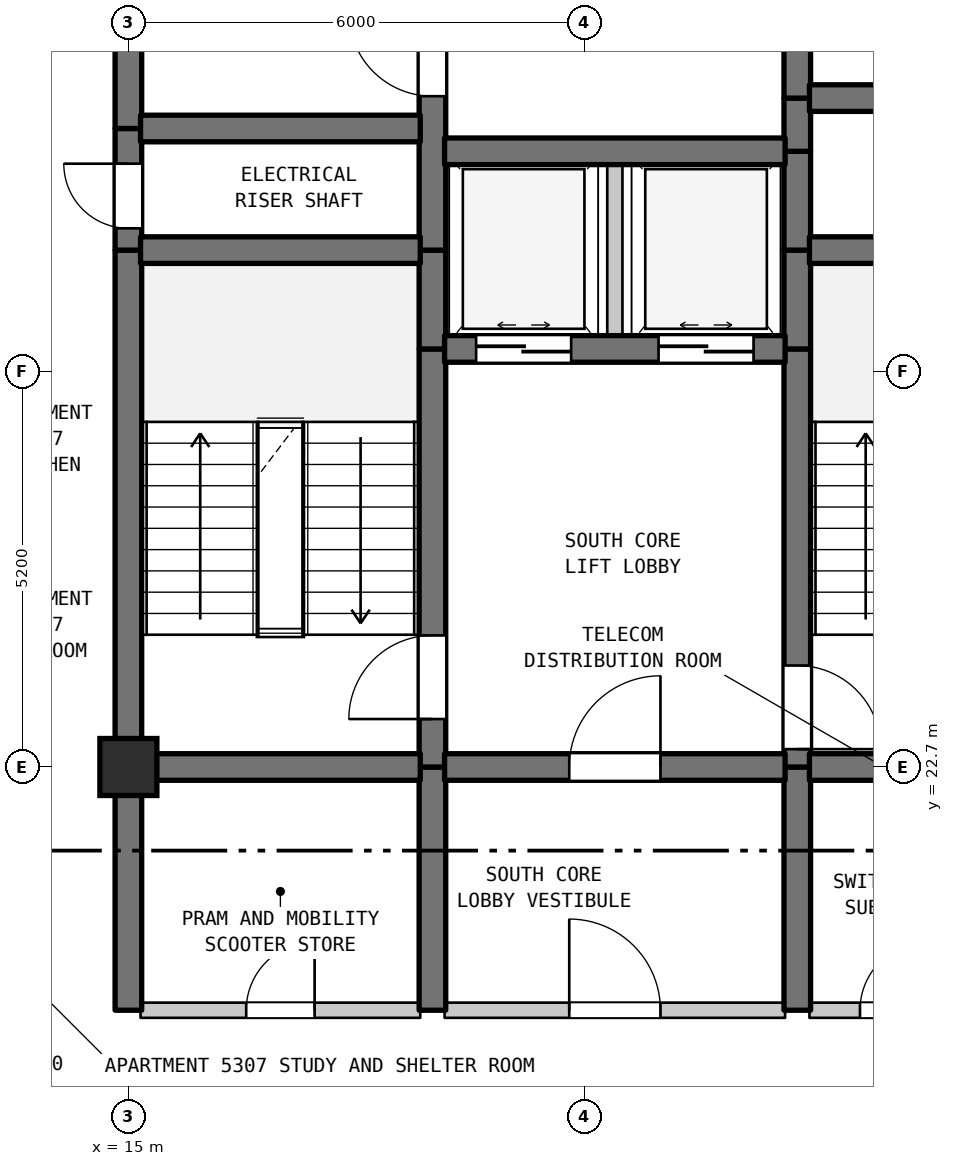
"""IFC4 building model, lengths in metres.
Left out: names, types, materials, properties, quantities, classifications, styles, units other than length and angle.
Written with IfcOpenShell. Run it as: python <this file> out.ifc"""

import sys

from ifc_helpers import new_model, si_unit, direction, frame, frame_2d, origin, origin_2d, place, context, subcontext, project, spatial, rectangle, extrude, element, fill, save


model = new_model("IFC4")
c1 = context("Model", 3, precision=1e-05, world=origin(), true_north=direction((0.0, 1.0)))
c2 = subcontext(c1, "Body", "Model", "MODEL_VIEW")
j1 = project(units=[si_unit("LENGTHUNIT", "METRE"), si_unit("PLANEANGLEUNIT", "RADIAN")], contexts=[c1])
p1 = place(None, origin())
s1 = spatial("IfcSite", under=j1, at=p1, CompositionType="ELEMENT")
p2 = place(p1, origin())
s2 = spatial("IfcBuilding", under=s1, at=p2, CompositionType="ELEMENT")
p3 = place(p2, frame((0.0, 0.0, 214.3)))
s3 = spatial("IfcBuildingStorey", under=s2, at=p3, CompositionType="ELEMENT", Elevation=214.3)
p4 = place(p3, frame((15.0, 22.7, 0.0), z_axis=(0.0, 0.0, 1.0), x_axis=(1.0, 0.0, 0.0)))
e1 = element("IfcColumn", 1, at=p4, inside=s3, PredefinedType="COLUMN", context=c2, shape_type="SweptSolid", body=[
    extrude(rectangle(XDim=0.75, YDim=0.75, at=origin_2d()), origin(), (0.0, 0.0, 1.0), 3.7),
])
p5 = place(p3, frame((15.0, 19.5, 0.0), z_axis=(0.0, 0.0, 1.0), x_axis=(0.0, 1.0, 0.0)))
e2 = element("IfcWall", 2, at=p5, inside=s3, PredefinedType="SHEAR", context=c2, shape_type="SweptSolid", body=[
    extrude(rectangle(XDim=3.2, YDim=0.35, at=frame_2d((1.6, 0.0))), origin(), (0.0, 0.0, 1.0), 3.38),
])
p6 = place(p3, frame((15.0, 22.7, 0.0), z_axis=(0.0, 0.0, 1.0), x_axis=(0.0, 1.0, 0.0)))
e3 = element("IfcWall", 3, at=p6, inside=s3, PredefinedType="SHEAR", context=c2, shape_type="SweptSolid", body=[
    extrude(rectangle(XDim=6.8, YDim=0.35, at=frame_2d((3.4, 0.0))), origin(), (0.0, 0.0, 1.0), 3.38),
])
p7 = place(p3, frame((15.0, 29.5, 0.0), z_axis=(0.0, 0.0, 1.0), x_axis=(0.0, 1.0, 0.0)))
e4 = element("IfcWall", 4, at=p7, inside=s3, PredefinedType="SHEAR", context=c2, shape_type="SweptSolid", body=[
    extrude(rectangle(XDim=1.6, YDim=0.35, at=frame_2d((0.8, 0.0))), origin(), (0.0, 0.0, 1.0), 3.38),
])
p8 = place(p7, frame((0.287, 0.0, 0.0)))
e5 = element("IfcOpeningElement", 5, at=p8, cuts=e4, PredefinedType="OPENING", context=c2, shape_type="SweptSolid", body=[
    extrude(rectangle(XDim=0.85, YDim=2.1, at=frame_2d((0.425, 1.05))), frame((0.0, 0.185, 0.0), z_axis=(0.0, -1.0, 0.0), x_axis=(1.0, 0.0, 0.0)), (0.0, 0.0, 1.0), 0.37),
])
p9 = place(p3, frame((15.0, 31.1, 0.0), z_axis=(0.0, 0.0, 1.0), x_axis=(0.0, 1.0, 0.0)))
e6 = element("IfcWall", 6, at=p9, inside=s3, PredefinedType="SHEAR", context=c2, shape_type="SweptSolid", body=[
    extrude(rectangle(XDim=6.8, YDim=0.35, at=frame_2d((3.4, 0.0))), origin(), (0.0, 0.0, 1.0), 3.38),
])
p10 = place(p3, frame((19.0, 19.5, 0.0), z_axis=(0.0, 0.0, 1.0), x_axis=(0.0, 1.0, 0.0)))
e7 = element("IfcWall", 7, at=p10, inside=s3, PredefinedType="SHEAR", context=c2, shape_type="SweptSolid", body=[
    extrude(rectangle(XDim=3.2, YDim=0.35, at=frame_2d((1.6, 0.0))), origin(), (0.0, 0.0, 1.0), 3.38),
])
p11 = place(p3, frame((19.0, 22.7, 0.0), z_axis=(0.0, 0.0, 1.0), x_axis=(0.0, 1.0, 0.0)))
e8 = element("IfcWall", 8, at=p11, inside=s3, PredefinedType="SHEAR", context=c2, shape_type="SweptSolid", body=[
    extrude(rectangle(XDim=5.5, YDim=0.35, at=frame_2d((2.75, 0.0))), origin(), (0.0, 0.0, 1.0), 3.38),
])
p12 = place(p11, frame((0.631, 0.0, 0.0)))
e9 = element("IfcOpeningElement", 9, at=p12, cuts=e8, PredefinedType="OPENING", context=c2, shape_type="SweptSolid", body=[
    extrude(rectangle(XDim=1.1, YDim=2.15, at=frame_2d((0.55, 1.075))), frame((0.0, 0.185, 0.0), z_axis=(0.0, -1.0, 0.0), x_axis=(1.0, 0.0, 0.0)), (0.0, 0.0, 1.0), 0.37),
])
p13 = place(p3, frame((19.0, 28.2, 0.0), z_axis=(0.0, 0.0, 1.0), x_axis=(0.0, 1.0, 0.0)))
e10 = element("IfcWall", 10, at=p13, inside=s3, PredefinedType="SHEAR", context=c2, shape_type="SweptSolid", body=[
    extrude(rectangle(XDim=1.3, YDim=0.35, at=frame_2d((0.65, 0.0))), origin(), (0.0, 0.0, 1.0), 3.38),
])
p14 = place(p3, frame((19.0, 29.5, 0.0), z_axis=(0.0, 0.0, 1.0), x_axis=(0.0, 1.0, 0.0)))
e11 = element("IfcWall", 11, at=p14, inside=s3, PredefinedType="SHEAR", context=c2, shape_type="SweptSolid", body=[
    extrude(rectangle(XDim=5.5, YDim=0.35, at=frame_2d((2.75, 0.0))), origin(), (0.0, 0.0, 1.0), 3.38),
])
p15 = place(p14, frame((2.025, 0.0, 0.0)))
e12 = element("IfcOpeningElement", 12, at=p15, cuts=e11, PredefinedType="OPENING", context=c2, shape_type="SweptSolid", body=[
    extrude(rectangle(XDim=1.1, YDim=2.15, at=frame_2d((0.55, 1.075))), frame((0.0, 0.185, 0.0), z_axis=(0.0, -1.0, 0.0), x_axis=(1.0, 0.0, 0.0)), (0.0, 0.0, 1.0), 0.37),
])
p16 = place(p3, frame((21.4, 28.2, 0.0), z_axis=(0.0, 0.0, 1.0), x_axis=(0.0, 1.0, 0.0)))
e13 = element("IfcWall", 13, at=p16, inside=s3, PredefinedType="STANDARD", context=c2, shape_type="SweptSolid", body=[
    extrude(rectangle(XDim=2.6, YDim=0.2, at=frame_2d((1.3, 0.0))), origin(), (0.0, 0.0, 1.0), 3.38),
])
p17 = place(p3, frame((23.8, 19.5, 0.0), z_axis=(0.0, 0.0, 1.0), x_axis=(0.0, 1.0, 0.0)))
e14 = element("IfcWall", 14, at=p17, inside=s3, PredefinedType="SHEAR", context=c2, shape_type="SweptSolid", body=[
    extrude(rectangle(XDim=3.2, YDim=0.35, at=frame_2d((1.6, 0.0))), origin(), (0.0, 0.0, 1.0), 3.38),
])
p18 = place(p3, frame((23.8, 22.7, 0.0), z_axis=(0.0, 0.0, 1.0), x_axis=(0.0, 1.0, 0.0)))
e15 = element("IfcWall", 15, at=p18, inside=s3, PredefinedType="SHEAR", context=c2, shape_type="SweptSolid", body=[
    extrude(rectangle(XDim=5.5, YDim=0.35, at=frame_2d((2.75, 0.0))), origin(), (0.0, 0.0, 1.0), 3.38),
])
p19 = place(p18, frame((0.235, 0.0, 0.0)))
e16 = element("IfcOpeningElement", 16, at=p19, cuts=e15, PredefinedType="OPENING", context=c2, shape_type="SweptSolid", body=[
    extrude(rectangle(XDim=1.1, YDim=2.15, at=frame_2d((0.55, 1.075))), frame((0.0, 0.185, 0.0), z_axis=(0.0, -1.0, 0.0), x_axis=(1.0, 0.0, 0.0)), (0.0, 0.0, 1.0), 0.37),
])
for number, where, z_axis, x_axis in (
    (17, (23.8, 28.2, 0.0), (0.0, 0.0, 1.0), (0.0, 1.0, 0.0)),
    (18, (23.8, 29.5, 0.0), (0.0, 0.0, 1.0), (0.0, 1.0, 0.0)),
):
    element("IfcWall", number, at=place(p3, frame(where, z_axis=z_axis, x_axis=x_axis)), inside=s3, PredefinedType="SHEAR", context=c2, shape_type="SweptSolid", body=[
        extrude(rectangle(XDim=1.3, YDim=0.35, at=frame_2d((0.65, 0.0))), origin(), (0.0, 0.0, 1.0), 3.38),
    ])
p20 = place(p3, frame((23.8, 30.8, 0.0), z_axis=(0.0, 0.0, 1.0), x_axis=(0.0, 1.0, 0.0)))
e19 = element("IfcWall", 19, at=p20, inside=s3, PredefinedType="SHEAR", context=c2, shape_type="SweptSolid", body=[
    extrude(rectangle(XDim=0.7, YDim=0.35, at=frame_2d((0.35, 0.0))), origin(), (0.0, 0.0, 1.0), 3.38),
])
p21 = place(p3, frame((23.8, 31.5, 0.0), z_axis=(0.0, 0.0, 1.0), x_axis=(0.0, 1.0, 0.0)))
e20 = element("IfcWall", 20, at=p21, inside=s3, PredefinedType="SHEAR", context=c2, shape_type="SweptSolid", body=[
    extrude(rectangle(XDim=3.5, YDim=0.35, at=frame_2d((1.75, 0.0))), origin(), (0.0, 0.0, 1.0), 3.38),
])
p22 = place(p21, frame((1.127, 0.0, 0.0)))
e21 = element("IfcOpeningElement", 21, at=p22, cuts=e20, PredefinedType="OPENING", context=c2, shape_type="SweptSolid", body=[
    extrude(rectangle(XDim=1.1, YDim=2.15, at=frame_2d((0.55, 1.075))), frame((0.0, 0.185, 0.0), z_axis=(0.0, -1.0, 0.0), x_axis=(1.0, 0.0, 0.0)), (0.0, 0.0, 1.0), 0.37),
])
p23 = place(p3, frame((15.16, 19.5, 0.0), z_axis=(0.0, 0.0, 1.0), x_axis=(1.0, 0.0, 0.0)))
e22 = element("IfcWall", 22, at=p23, inside=s3, PredefinedType="STANDARD", context=c2, shape_type="SweptSolid", body=[
    extrude(rectangle(XDim=3.68, YDim=0.2, at=frame_2d((1.84, 0.0))), origin(), (0.0, 0.0, 1.0), 3.38),
])
p24 = place(p23, frame((1.39, 0.0, 0.0)))
e23 = element("IfcOpeningElement", 23, at=p24, cuts=e22, PredefinedType="OPENING", context=c2, shape_type="SweptSolid", body=[
    extrude(rectangle(XDim=0.9, YDim=2.15, at=frame_2d((0.45, 1.075))), frame((0.0, 0.11, 0.0), z_axis=(0.0, -1.0, 0.0), x_axis=(1.0, 0.0, 0.0)), (0.0, 0.0, 1.0), 0.22),
])
p25 = place(p3, frame((19.16, 19.5, 0.0), z_axis=(0.0, 0.0, 1.0), x_axis=(1.0, 0.0, 0.0)))
e24 = element("IfcWall", 24, at=p25, inside=s3, PredefinedType="STANDARD", context=c2, shape_type="SweptSolid", body=[
    extrude(rectangle(XDim=4.48, YDim=0.2, at=frame_2d((2.24, 0.0))), origin(), (0.0, 0.0, 1.0), 3.38),
])
p26 = place(p25, frame((1.64, 0.0, 0.0)))
e25 = element("IfcOpeningElement", 25, at=p26, cuts=e24, PredefinedType="OPENING", context=c2, shape_type="SweptSolid", body=[
    extrude(rectangle(XDim=1.2, YDim=2.2, at=frame_2d((0.6, 1.1))), frame((0.0, 0.11, 0.0), z_axis=(0.0, -1.0, 0.0), x_axis=(1.0, 0.0, 0.0)), (0.0, 0.0, 1.0), 0.22),
])
p27 = place(p3, frame((23.96, 19.5, 0.0), z_axis=(0.0, 0.0, 1.0), x_axis=(1.0, 0.0, 0.0)))
e26 = element("IfcWall", 26, at=p27, inside=s3, PredefinedType="STANDARD", context=c2, shape_type="SweptSolid", body=[
    extrude(rectangle(XDim=4.455, YDim=0.2, at=frame_2d((2.228, 0.0))), origin(), (0.0, 0.0, 1.0), 3.38),
])
p28 = place(p27, frame((0.665, 0.0, 0.0)))
e27 = element("IfcOpeningElement", 27, at=p28, cuts=e26, PredefinedType="OPENING", context=c2, shape_type="SweptSolid", body=[
    extrude(rectangle(XDim=0.9, YDim=2.15, at=frame_2d((0.45, 1.075))), frame((0.0, 0.11, 0.0), z_axis=(0.0, -1.0, 0.0), x_axis=(1.0, 0.0, 0.0)), (0.0, 0.0, 1.0), 0.22),
])
p29 = place(p27, frame((2.791, 0.0, 0.0)))
e28 = element("IfcOpeningElement", 28, at=p29, cuts=e26, PredefinedType="OPENING", context=c2, shape_type="SweptSolid", body=[
    extrude(rectangle(XDim=0.9, YDim=2.15, at=frame_2d((0.45, 1.075))), frame((0.0, 0.11, 0.0), z_axis=(0.0, -1.0, 0.0), x_axis=(1.0, 0.0, 0.0)), (0.0, 0.0, 1.0), 0.22),
])
p30 = place(p3, frame((15.16, 22.7, 0.0), z_axis=(0.0, 0.0, 1.0), x_axis=(1.0, 0.0, 0.0)))
e29 = element("IfcWall", 29, at=p30, inside=s3, PredefinedType="SHEAR", context=c2, shape_type="SweptSolid", body=[
    extrude(rectangle(XDim=3.68, YDim=0.35, at=frame_2d((1.84, 0.0))), origin(), (0.0, 0.0, 1.0), 3.38),
])
p31 = place(p3, frame((19.16, 22.7, 0.0), z_axis=(0.0, 0.0, 1.0), x_axis=(1.0, 0.0, 0.0)))
e30 = element("IfcWall", 30, at=p31, inside=s3, PredefinedType="SHEAR", context=c2, shape_type="SweptSolid", body=[
    extrude(rectangle(XDim=4.48, YDim=0.35, at=frame_2d((2.24, 0.0))), origin(), (0.0, 0.0, 1.0), 3.38),
])
p32 = place(p31, frame((1.64, 0.0, 0.0)))
e31 = element("IfcOpeningElement", 31, at=p32, cuts=e30, PredefinedType="OPENING", context=c2, shape_type="SweptSolid", body=[
    extrude(rectangle(XDim=1.2, YDim=2.2, at=frame_2d((0.6, 1.1))), frame((0.0, 0.185, 0.0), z_axis=(0.0, -1.0, 0.0), x_axis=(1.0, 0.0, 0.0)), (0.0, 0.0, 1.0), 0.37),
])
p33 = place(p3, frame((23.96, 22.7, 0.0), z_axis=(0.0, 0.0, 1.0), x_axis=(1.0, 0.0, 0.0)))
e32 = element("IfcWall", 32, at=p33, inside=s3, PredefinedType="SHEAR", context=c2, shape_type="SweptSolid", body=[
    extrude(rectangle(XDim=3.18, YDim=0.35, at=frame_2d((1.59, 0.0))), origin(), (0.0, 0.0, 1.0), 3.38),
])
p34 = place(p3, frame((19.16, 28.2, 0.0), z_axis=(0.0, 0.0, 1.0), x_axis=(1.0, 0.0, 0.0)))
e33 = element("IfcWall", 33, at=p34, inside=s3, PredefinedType="SHEAR", context=c2, shape_type="SweptSolid", body=[
    extrude(rectangle(XDim=4.48, YDim=0.35, at=frame_2d((2.24, 0.0))), origin(), (0.0, 0.0, 1.0), 3.38),
])
p35 = place(p34, frame((0.415, 0.0, 0.0)))
e34 = element("IfcOpeningElement", 34, at=p35, cuts=e33, PredefinedType="OPENING", context=c2, shape_type="SweptSolid", body=[
    extrude(rectangle(XDim=1.25, YDim=2.2, at=frame_2d((0.625, 1.1))), frame((0.0, 0.185, 0.0), z_axis=(0.0, -1.0, 0.0), x_axis=(1.0, 0.0, 0.0)), (0.0, 0.0, 1.0), 0.37),
])
p36 = place(p34, frame((2.815, 0.0, 0.0)))
e35 = element("IfcOpeningElement", 35, at=p36, cuts=e33, PredefinedType="OPENING", context=c2, shape_type="SweptSolid", body=[
    extrude(rectangle(XDim=1.25, YDim=2.2, at=frame_2d((0.625, 1.1))), frame((0.0, 0.185, 0.0), z_axis=(0.0, -1.0, 0.0), x_axis=(1.0, 0.0, 0.0)), (0.0, 0.0, 1.0), 0.37),
])
p37 = place(p3, frame((15.16, 29.5, 0.0), z_axis=(0.0, 0.0, 1.0), x_axis=(1.0, 0.0, 0.0)))
e36 = element("IfcWall", 36, at=p37, inside=s3, PredefinedType="SHEAR", context=c2, shape_type="SweptSolid", body=[
    extrude(rectangle(XDim=3.68, YDim=0.35, at=frame_2d((1.84, 0.0))), origin(), (0.0, 0.0, 1.0), 3.38),
])
p38 = place(p3, frame((23.96, 29.5, 0.0), z_axis=(0.0, 0.0, 1.0), x_axis=(1.0, 0.0, 0.0)))
e37 = element("IfcWall", 37, at=p38, inside=s3, PredefinedType="SHEAR", context=c2, shape_type="SweptSolid", body=[
    extrude(rectangle(XDim=3.18, YDim=0.35, at=frame_2d((1.59, 0.0))), origin(), (0.0, 0.0, 1.0), 3.38),
])
p39 = place(p3, frame((19.16, 30.8, 0.0), z_axis=(0.0, 0.0, 1.0), x_axis=(1.0, 0.0, 0.0)))
e38 = element("IfcWall", 38, at=p39, inside=s3, PredefinedType="SHEAR", context=c2, shape_type="SweptSolid", body=[
    extrude(rectangle(XDim=4.48, YDim=0.35, at=frame_2d((2.24, 0.0))), origin(), (0.0, 0.0, 1.0), 3.38),
])
p40 = place(p3, frame((15.16, 31.1, 0.0), z_axis=(0.0, 0.0, 1.0), x_axis=(1.0, 0.0, 0.0)))
e39 = element("IfcWall", 39, at=p40, inside=s3, PredefinedType="SHEAR", context=c2, shape_type="SweptSolid", body=[
    extrude(rectangle(XDim=3.68, YDim=0.35, at=frame_2d((1.84, 0.0))), origin(), (0.0, 0.0, 1.0), 3.38),
])
p41 = place(p3, frame((23.96, 31.5, 0.0), z_axis=(0.0, 0.0, 1.0), x_axis=(1.0, 0.0, 0.0)))
e40 = element("IfcWall", 40, at=p41, inside=s3, PredefinedType="SHEAR", context=c2, shape_type="SweptSolid", body=[
    extrude(rectangle(XDim=3.18, YDim=0.35, at=frame_2d((1.59, 0.0))), origin(), (0.0, 0.0, 1.0), 3.38),
])
p42 = place(p41, frame((1.094, 0.0, 0.0)))
e41 = element("IfcOpeningElement", 41, at=p42, cuts=e40, PredefinedType="OPENING", context=c2, shape_type="SweptSolid", body=[
    extrude(rectangle(XDim=0.85, YDim=2.1, at=frame_2d((0.425, 1.05))), frame((0.0, 0.185, 0.0), z_axis=(0.0, -1.0, 0.0), x_axis=(1.0, 0.0, 0.0)), (0.0, 0.0, 1.0), 0.37),
])
p43 = place(p8, origin())
e42 = element("IfcDoor", 42, at=p43, inside=s3, OperationType="SINGLE_SWING_RIGHT", PredefinedType="DOOR", context=c2, shape_type="SweptSolid", body=[
    extrude(rectangle(XDim=0.85, YDim=2.1, at=frame_2d((0.425, 1.05))), frame((0.0, 0.025, 0.0), z_axis=(0.0, -1.0, 0.0), x_axis=(1.0, 0.0, 0.0)), (0.0, 0.0, 1.0), 0.05),
])
fill(e5, e42)
p44 = place(p12, origin())
e43 = element("IfcDoor", 43, at=p44, inside=s3, OperationType="SINGLE_SWING_LEFT", PredefinedType="DOOR", context=c2, shape_type="SweptSolid", body=[
    extrude(rectangle(XDim=1.1, YDim=2.15, at=frame_2d((0.55, 1.075))), frame((0.0, 0.025, 0.0), z_axis=(0.0, -1.0, 0.0), x_axis=(1.0, 0.0, 0.0)), (0.0, 0.0, 1.0), 0.05),
])
fill(e9, e43)
p45 = place(p15, origin())
e44 = element("IfcDoor", 44, at=p45, inside=s3, OperationType="SINGLE_SWING_RIGHT", PredefinedType="DOOR", context=c2, shape_type="SweptSolid", body=[
    extrude(rectangle(XDim=1.1, YDim=2.15, at=frame_2d((0.55, 1.075))), frame((0.0, 0.025, 0.0), z_axis=(0.0, -1.0, 0.0), x_axis=(1.0, 0.0, 0.0)), (0.0, 0.0, 1.0), 0.05),
])
fill(e12, e44)
p46 = place(p19, frame((1.1, 0.0, 0.0), z_axis=(0.0, 0.0, 1.0), x_axis=(-1.0, 0.0, 0.0)))
e45 = element("IfcDoor", 45, at=p46, inside=s3, OperationType="SINGLE_SWING_LEFT", PredefinedType="DOOR", context=c2, shape_type="SweptSolid", body=[
    extrude(rectangle(XDim=1.1, YDim=2.15, at=frame_2d((0.55, 1.075))), frame((0.0, 0.025, 0.0), z_axis=(0.0, -1.0, 0.0), x_axis=(1.0, 0.0, 0.0)), (0.0, 0.0, 1.0), 0.05),
])
fill(e16, e45)
p47 = place(p24, origin())
e46 = element("IfcDoor", 46, at=p47, inside=s3, OperationType="SINGLE_SWING_RIGHT", PredefinedType="DOOR", context=c2, shape_type="SweptSolid", body=[
    extrude(rectangle(XDim=0.9, YDim=2.15, at=frame_2d((0.45, 1.075))), frame((0.0, 0.025, 0.0), z_axis=(0.0, -1.0, 0.0), x_axis=(1.0, 0.0, 0.0)), (0.0, 0.0, 1.0), 0.05),
])
fill(e23, e46)
p48 = place(p26, origin())
e47 = element("IfcDoor", 47, at=p48, inside=s3, OperationType="SINGLE_SWING_LEFT", PredefinedType="DOOR", context=c2, shape_type="SweptSolid", body=[
    extrude(rectangle(XDim=1.2, YDim=2.2, at=frame_2d((0.6, 1.1))), frame((0.0, 0.025, 0.0), z_axis=(0.0, -1.0, 0.0), x_axis=(1.0, 0.0, 0.0)), (0.0, 0.0, 1.0), 0.05),
])
fill(e25, e47)
p49 = place(p28, origin())
e48 = element("IfcDoor", 48, at=p49, inside=s3, OperationType="SINGLE_SWING_RIGHT", PredefinedType="DOOR", context=c2, shape_type="SweptSolid", body=[
    extrude(rectangle(XDim=0.9, YDim=2.15, at=frame_2d((0.45, 1.075))), frame((0.0, 0.025, 0.0), z_axis=(0.0, -1.0, 0.0), x_axis=(1.0, 0.0, 0.0)), (0.0, 0.0, 1.0), 0.05),
])
fill(e27, e48)
p50 = place(p32, origin())
e49 = element("IfcDoor", 49, at=p50, inside=s3, OperationType="SINGLE_SWING_RIGHT", PredefinedType="DOOR", context=c2, shape_type="SweptSolid", body=[
    extrude(rectangle(XDim=1.2, YDim=2.2, at=frame_2d((0.6, 1.1))), frame((0.0, 0.025, 0.0), z_axis=(0.0, -1.0, 0.0), x_axis=(1.0, 0.0, 0.0)), (0.0, 0.0, 1.0), 0.05),
])
fill(e31, e49)
p51 = place(p35, origin())
e50 = element("IfcDoor", 50, at=p51, inside=s3, OperationType="DOUBLE_DOOR_SLIDING", PredefinedType="DOOR", context=c2, shape_type="SweptSolid", body=[
    extrude(rectangle(XDim=1.25, YDim=2.2, at=frame_2d((0.625, 1.1))), frame((0.0, 0.025, 0.0), z_axis=(0.0, -1.0, 0.0), x_axis=(1.0, 0.0, 0.0)), (0.0, 0.0, 1.0), 0.05),
])
fill(e34, e50)
p52 = place(p36, origin())
e51 = element("IfcDoor", 51, at=p52, inside=s3, OperationType="DOUBLE_DOOR_SLIDING", PredefinedType="DOOR", context=c2, shape_type="SweptSolid", body=[
    extrude(rectangle(XDim=1.25, YDim=2.2, at=frame_2d((0.625, 1.1))), frame((0.0, 0.025, 0.0), z_axis=(0.0, -1.0, 0.0), x_axis=(1.0, 0.0, 0.0)), (0.0, 0.0, 1.0), 0.05),
])
fill(e35, e51)
save(model, sys.argv[1])
